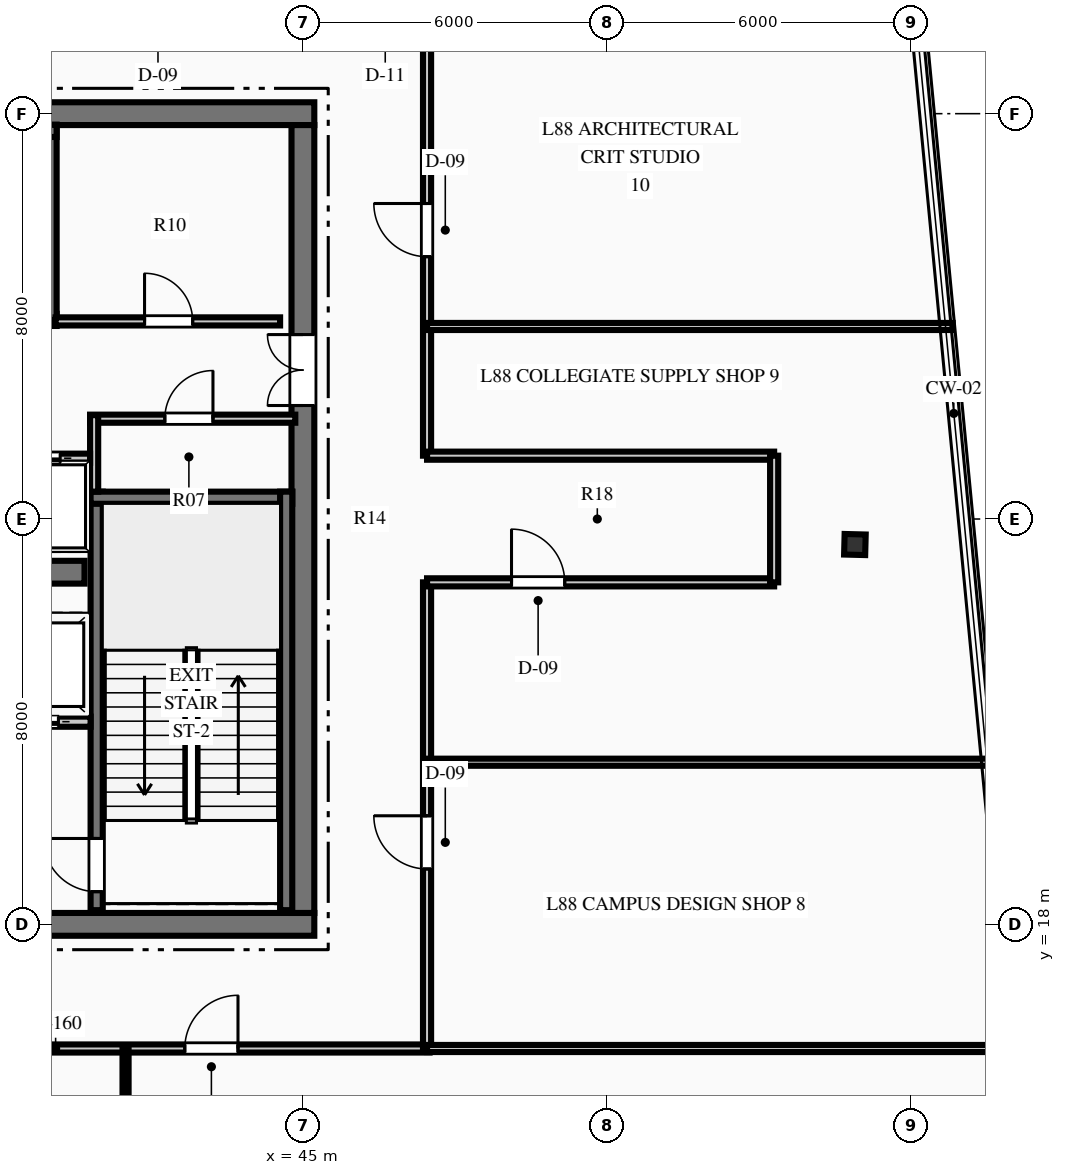
"""IFC4 building model, lengths in metres.
Left out: names, types, materials, properties, quantities, classifications, styles, units other than length and angle.
Written with IfcOpenShell. Run it as: python <this file> out.ifc"""

import sys

from ifc_helpers import new_model, si_unit, direction, frame, frame_2d, origin, origin_2d, place, context, subcontext, project, spatial, rectangle, i_section, extrude, element, fill, save


model = new_model("IFC4")
c1 = context("Model", 3, precision=1e-05, world=origin(), true_north=direction((0.0, 1.0)))
c2 = subcontext(c1, "Body", "Model", "MODEL_VIEW")
j1 = project(units=[si_unit("LENGTHUNIT", "METRE"), si_unit("PLANEANGLEUNIT", "RADIAN")], contexts=[c1])
p1 = place(None, origin())
s1 = spatial("IfcSite", under=j1, at=p1, CompositionType="ELEMENT")
p2 = place(p1, origin())
s2 = spatial("IfcBuilding", under=s1, at=p2, CompositionType="ELEMENT")
p3 = place(p2, frame((0.0, 0.0, 347.7)))
s3 = spatial("IfcBuildingStorey", under=s2, at=p3, CompositionType="ELEMENT", Elevation=347.7)
p4 = place(p3, frame((26.775, 18.0, 0.0), z_axis=(0.0, 0.0, 1.0), x_axis=(1.0, 0.0, 0.0)))
e1 = element("IfcWall", 1, at=p4, inside=s3, PredefinedType="SHEAR", context=c2, shape_type="SweptSolid", body=[
    extrude(rectangle(XDim=18.45, YDim=0.45, at=frame_2d((9.225, 0.0))), origin(), (0.0, 0.0, 1.0), 4.5),
])
p5 = place(p4, frame((7.325, 0.0, 0.0)))
e2 = element("IfcOpeningElement", 2, at=p5, cuts=e1, PredefinedType="OPENING", context=c2, shape_type="SweptSolid", body=[
    extrude(rectangle(XDim=1.1, YDim=2.15, at=frame_2d((0.55, 1.075))), frame((0.0, 0.235, 0.0), z_axis=(0.0, -1.0, 0.0), x_axis=(1.0, 0.0, 0.0)), (0.0, 0.0, 1.0), 0.47),
])
p6 = place(p4, frame((10.025, 0.0, 0.0)))
e3 = element("IfcOpeningElement", 3, at=p6, cuts=e1, PredefinedType="OPENING", context=c2, shape_type="SweptSolid", body=[
    extrude(rectangle(XDim=1.1, YDim=2.15, at=frame_2d((0.55, 1.075))), frame((0.0, 0.235, 0.0), z_axis=(0.0, -1.0, 0.0), x_axis=(1.0, 0.0, 0.0)), (0.0, 0.0, 1.0), 0.47),
])
p7 = place(p3, frame((26.775, 34.0, 0.0), z_axis=(0.0, 0.0, 1.0), x_axis=(1.0, 0.0, 0.0)))
e4 = element("IfcWall", 4, at=p7, inside=s3, PredefinedType="SHEAR", context=c2, shape_type="SweptSolid", body=[
    extrude(rectangle(XDim=18.45, YDim=0.45, at=frame_2d((9.225, 0.0))), origin(), (0.0, 0.0, 1.0), 4.5),
])
p8 = place(p3, frame((45.0, 18.225, 0.0), z_axis=(0.0, 0.0, 1.0), x_axis=(0.0, 1.0, 0.0)))
e5 = element("IfcWall", 5, at=p8, inside=s3, PredefinedType="SHEAR", context=c2, shape_type="SweptSolid", body=[
    extrude(rectangle(XDim=15.55, YDim=0.45, at=frame_2d((7.775, 0.0))), origin(), (0.0, 0.0, 1.0), 4.5),
])
p9 = place(p8, frame((10.015, 0.0, 0.0)))
e6 = element("IfcOpeningElement", 6, at=p9, cuts=e5, PredefinedType="OPENING", context=c2, shape_type="SweptSolid", body=[
    extrude(rectangle(XDim=1.4, YDim=2.2, at=frame_2d((0.7, 1.1))), frame((0.0, 0.235, 0.0), z_axis=(0.0, -1.0, 0.0), x_axis=(1.0, 0.0, 0.0)), (0.0, 0.0, 1.0), 0.47),
])
p10 = place(p3, frame((31.31, 24.95, 0.0), z_axis=(0.0, 0.0, 1.0), x_axis=(1.0, 0.0, 0.0)))
e7 = element("IfcWall", 7, at=p10, inside=s3, PredefinedType="SHEAR", context=c2, shape_type="SweptSolid", body=[
    extrude(rectangle(XDim=9.38, YDim=0.45, at=frame_2d((4.69, 0.0))), origin(), (0.0, 0.0, 1.0), 4.5),
])
p11 = place(p3, frame((40.93, 18.28, 0.0), z_axis=(0.0, 0.0, 1.0), x_axis=(0.0, 1.0, 0.0)))
e8 = element("IfcWall", 8, at=p11, inside=s3, PredefinedType="SHEAR", context=c2, shape_type="SweptSolid", body=[
    extrude(rectangle(XDim=8.26, YDim=0.24, at=frame_2d((4.13, 0.0))), origin(), (0.0, 0.0, 1.0), 4.5),
])
p12 = place(p11, frame((0.365, 0.0, 0.0)))
e9 = element("IfcOpeningElement", 9, at=p12, cuts=e8, PredefinedType="OPENING", context=c2, shape_type="SweptSolid", body=[
    extrude(rectangle(XDim=1.05, YDim=2.15, at=frame_2d((0.525, 1.075))), frame((0.0, 0.13, 0.0), z_axis=(0.0, -1.0, 0.0), x_axis=(1.0, 0.0, 0.0)), (0.0, 0.0, 1.0), 0.26),
])
p13 = place(p3, frame((40.81, 26.42, 0.0), z_axis=(0.0, 0.0, 1.0), x_axis=(1.0, 0.0, 0.0)))
e10 = element("IfcWall", 10, at=p13, inside=s3, PredefinedType="SHEAR", context=c2, shape_type="SweptSolid", body=[
    extrude(rectangle(XDim=3.98, YDim=0.24, at=frame_2d((1.99, 0.0))), origin(), (0.0, 0.0, 1.0), 4.5),
])
p14 = place(p3, frame((44.67, 18.28, 0.0), z_axis=(0.0, 0.0, 1.0), x_axis=(0.0, 1.0, 0.0)))
e11 = element("IfcWall", 11, at=p14, inside=s3, PredefinedType="SHEAR", context=c2, shape_type="SweptSolid", body=[
    extrude(rectangle(XDim=8.26, YDim=0.24, at=frame_2d((4.13, 0.0))), origin(), (0.0, 0.0, 1.0), 4.5),
])
p15 = place(p3, frame((31.76, 29.93, 0.0), z_axis=(0.0, 0.0, 1.0), x_axis=(1.0, 0.0, 0.0)))
e12 = element("IfcWall", 12, at=p15, inside=s3, PredefinedType="SHEAR", context=c2, shape_type="SweptSolid", body=[
    extrude(rectangle(XDim=8.38, YDim=0.24, at=frame_2d((4.19, 0.0))), origin(), (0.0, 0.0, 1.0), 4.5),
])
p16 = place(p15, frame((0.565, 0.0, 0.0)))
e13 = element("IfcOpeningElement", 13, at=p16, cuts=e12, PredefinedType="OPENING", context=c2, shape_type="SweptSolid", body=[
    extrude(rectangle(XDim=1.05, YDim=2.15, at=frame_2d((0.525, 1.075))), frame((0.0, 0.13, 0.0), z_axis=(0.0, -1.0, 0.0), x_axis=(1.0, 0.0, 0.0)), (0.0, 0.0, 1.0), 0.26),
])
p17 = place(p3, frame((40.02, 29.93, 0.0), z_axis=(0.0, 0.0, 1.0), x_axis=(0.0, 1.0, 0.0)))
e14 = element("IfcWall", 14, at=p17, inside=s3, PredefinedType="SHEAR", context=c2, shape_type="SweptSolid", body=[
    extrude(rectangle(XDim=3.85, YDim=0.24, at=frame_2d((1.925, 0.0))), origin(), (0.0, 0.0, 1.0), 4.5),
])
p18 = place(p3, frame((37.85, 33.66, 0.0), z_axis=(0.0, 0.0, 1.0), x_axis=(1.0, 0.0, 0.0)))
e15 = element("IfcWall", 15, at=p18, inside=s3, PredefinedType="SHEAR", context=c2, shape_type="SweptSolid", body=[
    extrude(rectangle(XDim=2.29, YDim=0.24, at=frame_2d((1.145, 0.0))), origin(), (0.0, 0.0, 1.0), 4.5),
])
p19 = place(p3, frame((55.894, 25.496, 0.0), z_axis=(0.0, 0.0, 1.0), x_axis=(0.025304572866, 0.999679788028, 0.0)))
e16 = element("IfcColumn", 16, at=p19, inside=s3, PredefinedType="COLUMN", context=c2, shape_type="SweptSolid", body=[
    extrude(i_section(OverallWidth=0.406, OverallDepth=0.416, WebThickness=0.03, FlangeThickness=0.048, at=origin_2d()), origin(), (0.0, 0.0, 1.0), 4.5),
])
p20 = place(p3, frame((36.12, 22.0, 0.0), z_axis=(0.0, 0.0, 1.0), x_axis=(1.0, 0.0, 0.0)))
e17 = element("IfcWall", 17, at=p20, inside=s3, PredefinedType="PARTITIONING", context=c2, shape_type="SweptSolid", body=[
    extrude(rectangle(XDim=4.69, YDim=0.2, at=frame_2d((2.345, 0.0))), origin(), (0.0, 0.0, 1.0), 4.1),
])
p21 = place(p20, frame((2.955, 0.0, 0.0)))
e18 = element("IfcOpeningElement", 18, at=p21, cuts=e17, PredefinedType="OPENING", context=c2, shape_type="SweptSolid", body=[
    extrude(rectangle(XDim=1.1, YDim=2.15, at=frame_2d((0.55, 1.075))), frame((0.0, 0.11, 0.0), z_axis=(0.0, -1.0, 0.0), x_axis=(1.0, 0.0, 0.0)), (0.0, 0.0, 1.0), 0.22),
])
p22 = place(p20, frame((0.08, 0.0, 0.0)))
e19 = element("IfcOpeningElement", 19, at=p22, cuts=e17, PredefinedType="OPENING", context=c2, shape_type="SweptSolid", body=[
    extrude(rectangle(XDim=1.4, YDim=2.2, at=frame_2d((0.7, 1.1))), frame((0.0, 0.11, 0.0), z_axis=(0.0, -1.0, 0.0), x_axis=(1.0, 0.0, 0.0)), (0.0, 0.0, 1.0), 0.22),
])
p23 = place(p3, frame((40.8, 27.98, 0.0), z_axis=(0.0, 0.0, 1.0), x_axis=(1.0, 0.0, 0.0)))
e20 = element("IfcWall", 20, at=p23, inside=s3, PredefinedType="PARTITIONING", context=c2, shape_type="SweptSolid", body=[
    extrude(rectangle(XDim=4.05, YDim=0.16, at=frame_2d((2.025, 0.0))), origin(), (0.0, 0.0, 1.0), 4.1),
])
p24 = place(p23, frame((1.475, 0.0, 0.0)))
e21 = element("IfcOpeningElement", 21, at=p24, cuts=e20, PredefinedType="OPENING", context=c2, shape_type="SweptSolid", body=[
    extrude(rectangle(XDim=0.95, YDim=2.15, at=frame_2d((0.475, 1.075))), frame((0.0, 0.09, 0.0), z_axis=(0.0, -1.0, 0.0), x_axis=(1.0, 0.0, 0.0)), (0.0, 0.0, 1.0), 0.18),
])
p25 = place(p3, frame((40.88, 26.54, 0.0), z_axis=(0.0, 0.0, 1.0), x_axis=(0.0, 1.0, 0.0)))
e22 = element("IfcWall", 22, at=p25, inside=s3, PredefinedType="PARTITIONING", context=c2, shape_type="SweptSolid", body=[
    extrude(rectangle(XDim=1.51, YDim=0.16, at=frame_2d((0.755, 0.0))), origin(), (0.0, 0.0, 1.0), 4.1),
])
p26 = place(p3, frame((40.12, 29.9, 0.0), z_axis=(0.0, 0.0, 1.0), x_axis=(1.0, 0.0, 0.0)))
e23 = element("IfcWall", 23, at=p26, inside=s3, PredefinedType="PARTITIONING", context=c2, shape_type="SweptSolid", body=[
    extrude(rectangle(XDim=4.43, YDim=0.16, at=frame_2d((2.215, 0.0))), origin(), (0.0, 0.0, 1.0), 4.1),
])
p27 = place(p26, frame((1.755, 0.0, 0.0)))
e24 = element("IfcOpeningElement", 24, at=p27, cuts=e23, PredefinedType="OPENING", context=c2, shape_type="SweptSolid", body=[
    extrude(rectangle(XDim=0.95, YDim=2.15, at=frame_2d((0.475, 1.075))), frame((0.0, 0.09, 0.0), z_axis=(0.0, -1.0, 0.0), x_axis=(1.0, 0.0, 0.0)), (0.0, 0.0, 1.0), 0.18),
])
p28 = place(p3, frame((31.2, 27.2, 0.0), z_axis=(0.0, 0.0, 1.0), x_axis=(1.0, 0.0, 0.0)))
e25 = element("IfcWall", 25, at=p28, inside=s3, PredefinedType="PARTITIONING", context=c2, shape_type="SweptSolid", body=[
    extrude(rectangle(XDim=9.6, YDim=0.18, at=frame_2d((4.8, 0.0))), origin(), (0.0, 0.0, 1.0), 4.1),
])
p29 = place(p28, frame((0.59, 0.0, 0.0)))
e26 = element("IfcOpeningElement", 26, at=p29, cuts=e25, PredefinedType="OPENING", context=c2, shape_type="SweptSolid", body=[
    extrude(rectangle(XDim=1.1, YDim=2.15, at=frame_2d((0.55, 1.075))), frame((0.0, 0.1, 0.0), z_axis=(0.0, -1.0, 0.0), x_axis=(1.0, 0.0, 0.0)), (0.0, 0.0, 1.0), 0.2),
])
p30 = place(p28, frame((2.99, 0.0, 0.0)))
e27 = element("IfcOpeningElement", 27, at=p30, cuts=e25, PredefinedType="OPENING", context=c2, shape_type="SweptSolid", body=[
    extrude(rectangle(XDim=1.1, YDim=2.15, at=frame_2d((0.55, 1.075))), frame((0.0, 0.1, 0.0), z_axis=(0.0, -1.0, 0.0), x_axis=(1.0, 0.0, 0.0)), (0.0, 0.0, 1.0), 0.2),
])
p31 = place(p28, frame((5.51, 0.0, 0.0)))
e28 = element("IfcOpeningElement", 28, at=p31, cuts=e25, PredefinedType="OPENING", context=c2, shape_type="SweptSolid", body=[
    extrude(rectangle(XDim=1.1, YDim=2.15, at=frame_2d((0.55, 1.075))), frame((0.0, 0.1, 0.0), z_axis=(0.0, -1.0, 0.0), x_axis=(1.0, 0.0, 0.0)), (0.0, 0.0, 1.0), 0.2),
])
p32 = place(p28, frame((7.91, 0.0, 0.0)))
e29 = element("IfcOpeningElement", 29, at=p32, cuts=e25, PredefinedType="OPENING", context=c2, shape_type="SweptSolid", body=[
    extrude(rectangle(XDim=1.1, YDim=2.15, at=frame_2d((0.55, 1.075))), frame((0.0, 0.1, 0.0), z_axis=(0.0, -1.0, 0.0), x_axis=(1.0, 0.0, 0.0)), (0.0, 0.0, 1.0), 0.2),
])
p33 = place(p3, frame((37.25, 15.55, 0.0), z_axis=(0.0, 0.0, 1.0), x_axis=(1.0, 0.0, 0.0)))
e30 = element("IfcWall", 30, at=p33, inside=s3, PredefinedType="PARTITIONING", context=c2, shape_type="SweptSolid", body=[
    extrude(rectangle(XDim=10.25, YDim=0.16, at=frame_2d((5.125, 0.0))), origin(), (0.0, 0.0, 1.0), 4.1),
])
p34 = place(p33, frame((5.419, 0.0, 0.0)))
e31 = element("IfcOpeningElement", 31, at=p34, cuts=e30, PredefinedType="OPENING", context=c2, shape_type="SweptSolid", body=[
    extrude(rectangle(XDim=1.05, YDim=2.15, at=frame_2d((0.525, 1.075))), frame((0.0, 0.09, 0.0), z_axis=(0.0, -1.0, 0.0), x_axis=(1.0, 0.0, 0.0)), (0.0, 0.0, 1.0), 0.18),
])
p35 = place(p3, frame((47.45, 15.55, 0.0), z_axis=(0.0, 0.0, 1.0), x_axis=(0.0, 1.0, 0.0)))
e32 = element("IfcWall", 32, at=p35, inside=s3, PredefinedType="PARTITIONING", context=c2, shape_type="SweptSolid", body=[
    extrude(rectangle(XDim=9.2, YDim=0.16, at=frame_2d((4.6, 0.0))), origin(), (0.0, 0.0, 1.0), 4.1),
])
p36 = place(p35, frame((3.543, 0.0, 0.0)))
e33 = element("IfcOpeningElement", 33, at=p36, cuts=e32, PredefinedType="OPENING", context=c2, shape_type="SweptSolid", body=[
    extrude(rectangle(XDim=1.05, YDim=2.15, at=frame_2d((0.525, 1.075))), frame((0.0, 0.09, 0.0), z_axis=(0.0, -1.0, 0.0), x_axis=(1.0, 0.0, 0.0)), (0.0, 0.0, 1.0), 0.18),
])
p37 = place(p3, frame((47.45, 27.25, 0.0), z_axis=(0.0, 0.0, 1.0), x_axis=(0.0, 1.0, 0.0)))
e34 = element("IfcWall", 34, at=p37, inside=s3, PredefinedType="PARTITIONING", context=c2, shape_type="SweptSolid", body=[
    extrude(rectangle(XDim=9.2, YDim=0.16, at=frame_2d((4.6, 0.0))), origin(), (0.0, 0.0, 1.0), 4.1),
])
p38 = place(p37, frame((3.927, 0.0, 0.0)))
e35 = element("IfcOpeningElement", 35, at=p38, cuts=e34, PredefinedType="OPENING", context=c2, shape_type="SweptSolid", body=[
    extrude(rectangle(XDim=1.05, YDim=2.15, at=frame_2d((0.525, 1.075))), frame((0.0, 0.09, 0.0), z_axis=(0.0, -1.0, 0.0), x_axis=(1.0, 0.0, 0.0)), (0.0, 0.0, 1.0), 0.18),
])
p39 = place(p3, frame((47.45, 24.75, 0.0), z_axis=(0.0, 0.0, 1.0), x_axis=(1.0, 0.0, 0.0)))
e36 = element("IfcWall", 36, at=p39, inside=s3, PredefinedType="PARTITIONING", context=c2, shape_type="SweptSolid", body=[
    extrude(rectangle(XDim=6.85, YDim=0.16, at=frame_2d((3.425, 0.0))), origin(), (0.0, 0.0, 1.0), 4.1),
])
p40 = place(p39, frame((1.667, 0.0, 0.0)))
e37 = element("IfcOpeningElement", 37, at=p40, cuts=e36, PredefinedType="OPENING", context=c2, shape_type="SweptSolid", body=[
    extrude(rectangle(XDim=1.05, YDim=2.15, at=frame_2d((0.525, 1.075))), frame((0.0, 0.09, 0.0), z_axis=(0.0, -1.0, 0.0), x_axis=(1.0, 0.0, 0.0)), (0.0, 0.0, 1.0), 0.18),
])
p41 = place(p3, frame((47.45, 27.25, 0.0), z_axis=(0.0, 0.0, 1.0), x_axis=(1.0, 0.0, 0.0)))
e38 = element("IfcWall", 38, at=p41, inside=s3, PredefinedType="PARTITIONING", context=c2, shape_type="SweptSolid", body=[
    extrude(rectangle(XDim=6.85, YDim=0.16, at=frame_2d((3.425, 0.0))), origin(), (0.0, 0.0, 1.0), 4.1),
])
p42 = place(p3, frame((54.3, 24.75, 0.0), z_axis=(0.0, 0.0, 1.0), x_axis=(0.0, 1.0, 0.0)))
e39 = element("IfcWall", 39, at=p42, inside=s3, PredefinedType="PARTITIONING", context=c2, shape_type="SweptSolid", body=[
    extrude(rectangle(XDim=2.5, YDim=0.16, at=frame_2d((1.25, 0.0))), origin(), (0.0, 0.0, 1.0), 4.1),
])
p43 = place(p3, frame((47.45, 15.55, 0.0), z_axis=(0.0, 0.0, 1.0), x_axis=(1.0, 0.0, 0.0)))
e40 = element("IfcWall", 40, at=p43, inside=s3, PredefinedType="PARTITIONING", context=c2, shape_type="SweptSolid", body=[
    extrude(rectangle(XDim=11.732, YDim=0.14, at=frame_2d((5.866, 0.0))), origin(), (0.0, 0.0, 1.0), 3.689),
])
p44 = place(p3, frame((41.5, 4.214, 0.0), z_axis=(0.0, 0.0, 1.0), x_axis=(0.0, 1.0, 0.0)))
e41 = element("IfcWall", 41, at=p44, inside=s3, PredefinedType="PARTITIONING", context=c2, shape_type="SweptSolid", body=[
    extrude(rectangle(XDim=11.336, YDim=0.12, at=frame_2d((5.668, 0.0))), origin(), (0.0, 0.0, 1.0), 4.1),
])
p45 = place(p3, frame((47.45, 21.2, 0.0), z_axis=(0.0, 0.0, 1.0), x_axis=(1.0, 0.0, 0.0)))
e42 = element("IfcWall", 42, at=p45, inside=s3, PredefinedType="PARTITIONING", context=c2, shape_type="SweptSolid", body=[
    extrude(rectangle(XDim=11.193, YDim=0.14, at=frame_2d((5.597, 0.0))), origin(), (0.0, 0.0, 1.0), 4.1),
])
p46 = place(p3, frame((47.45, 29.8, 0.0), z_axis=(0.0, 0.0, 1.0), x_axis=(1.0, 0.0, 0.0)))
e43 = element("IfcWall", 43, at=p46, inside=s3, PredefinedType="PARTITIONING", context=c2, shape_type="SweptSolid", body=[
    extrude(rectangle(XDim=10.373, YDim=0.14, at=frame_2d((5.187, 0.0))), origin(), (0.0, 0.0, 1.0), 4.1),
])
p47 = place(p24, origin())
e44 = element("IfcDoor", 44, at=p47, inside=s3, OperationType="SINGLE_SWING_RIGHT", PredefinedType="DOOR", context=c2, shape_type="SweptSolid", body=[
    extrude(rectangle(XDim=0.95, YDim=2.15, at=frame_2d((0.475, 1.075))), frame((0.0, 0.025, 0.0), z_axis=(0.0, -1.0, 0.0), x_axis=(1.0, 0.0, 0.0)), (0.0, 0.0, 1.0), 0.05),
])
fill(e21, e44)
p48 = place(p27, origin())
e45 = element("IfcDoor", 45, at=p48, inside=s3, OperationType="SINGLE_SWING_LEFT", PredefinedType="DOOR", context=c2, shape_type="SweptSolid", body=[
    extrude(rectangle(XDim=0.95, YDim=2.15, at=frame_2d((0.475, 1.075))), frame((0.0, 0.025, 0.0), z_axis=(0.0, -1.0, 0.0), x_axis=(1.0, 0.0, 0.0)), (0.0, 0.0, 1.0), 0.05),
])
fill(e24, e45)
p49 = place(p12, origin())
e46 = element("IfcDoor", 46, at=p49, inside=s3, OperationType="SINGLE_SWING_RIGHT", PredefinedType="DOOR", context=c2, shape_type="SweptSolid", body=[
    extrude(rectangle(XDim=1.05, YDim=2.15, at=frame_2d((0.525, 1.075))), frame((0.0, 0.025, 0.0), z_axis=(0.0, -1.0, 0.0), x_axis=(1.0, 0.0, 0.0)), (0.0, 0.0, 1.0), 0.05),
])
fill(e9, e46)
p50 = place(p9, origin())
e47 = element("IfcDoor", 47, at=p50, inside=s3, OperationType="DOUBLE_DOOR_SINGLE_SWING", PredefinedType="DOOR", context=c2, shape_type="SweptSolid", body=[
    extrude(rectangle(XDim=1.4, YDim=2.2, at=frame_2d((0.7, 1.1))), frame((0.0, 0.025, 0.0), z_axis=(0.0, -1.0, 0.0), x_axis=(1.0, 0.0, 0.0)), (0.0, 0.0, 1.0), 0.05),
])
fill(e6, e47)
p51 = place(p34, origin())
e48 = element("IfcDoor", 48, at=p51, inside=s3, OperationType="SINGLE_SWING_RIGHT", PredefinedType="DOOR", context=c2, shape_type="SweptSolid", body=[
    extrude(rectangle(XDim=1.05, YDim=2.15, at=frame_2d((0.525, 1.075))), frame((0.0, 0.025, 0.0), z_axis=(0.0, -1.0, 0.0), x_axis=(1.0, 0.0, 0.0)), (0.0, 0.0, 1.0), 0.05),
])
fill(e31, e48)
p52 = place(p36, origin())
e49 = element("IfcDoor", 49, at=p52, inside=s3, OperationType="SINGLE_SWING_RIGHT", PredefinedType="DOOR", context=c2, shape_type="SweptSolid", body=[
    extrude(rectangle(XDim=1.05, YDim=2.15, at=frame_2d((0.525, 1.075))), frame((0.0, 0.025, 0.0), z_axis=(0.0, -1.0, 0.0), x_axis=(1.0, 0.0, 0.0)), (0.0, 0.0, 1.0), 0.05),
])
fill(e33, e49)
p53 = place(p40, origin())
e50 = element("IfcDoor", 50, at=p53, inside=s3, OperationType="SINGLE_SWING_LEFT", PredefinedType="DOOR", context=c2, shape_type="SweptSolid", body=[
    extrude(rectangle(XDim=1.05, YDim=2.15, at=frame_2d((0.525, 1.075))), frame((0.0, 0.025, 0.0), z_axis=(0.0, -1.0, 0.0), x_axis=(1.0, 0.0, 0.0)), (0.0, 0.0, 1.0), 0.05),
])
fill(e37, e50)
p54 = place(p38, origin())
e51 = element("IfcDoor", 51, at=p54, inside=s3, OperationType="SINGLE_SWING_RIGHT", PredefinedType="DOOR", context=c2, shape_type="SweptSolid", body=[
    extrude(rectangle(XDim=1.05, YDim=2.15, at=frame_2d((0.525, 1.075))), frame((0.0, 0.025, 0.0), z_axis=(0.0, -1.0, 0.0), x_axis=(1.0, 0.0, 0.0)), (0.0, 0.0, 1.0), 0.05),
])
fill(e35, e51)
p55 = place(p32, origin())
e52 = element("IfcDoor", 52, at=p55, inside=s3, OperationType="SLIDING_TO_LEFT", PredefinedType="DOOR", context=c2, shape_type="SweptSolid", body=[
    extrude(rectangle(XDim=1.1, YDim=2.15, at=frame_2d((0.55, 1.075))), frame((0.0, 0.025, 0.0), z_axis=(0.0, -1.0, 0.0), x_axis=(1.0, 0.0, 0.0)), (0.0, 0.0, 1.0), 0.05),
])
fill(e29, e52)
p56 = place(p21, origin())
e53 = element("IfcDoor", 53, at=p56, inside=s3, OperationType="SLIDING_TO_LEFT", PredefinedType="DOOR", context=c2, shape_type="SweptSolid", body=[
    extrude(rectangle(XDim=1.1, YDim=2.15, at=frame_2d((0.55, 1.075))), frame((0.0, 0.025, 0.0), z_axis=(0.0, -1.0, 0.0), x_axis=(1.0, 0.0, 0.0)), (0.0, 0.0, 1.0), 0.05),
])
fill(e18, e53)
save(model, sys.argv[1])
